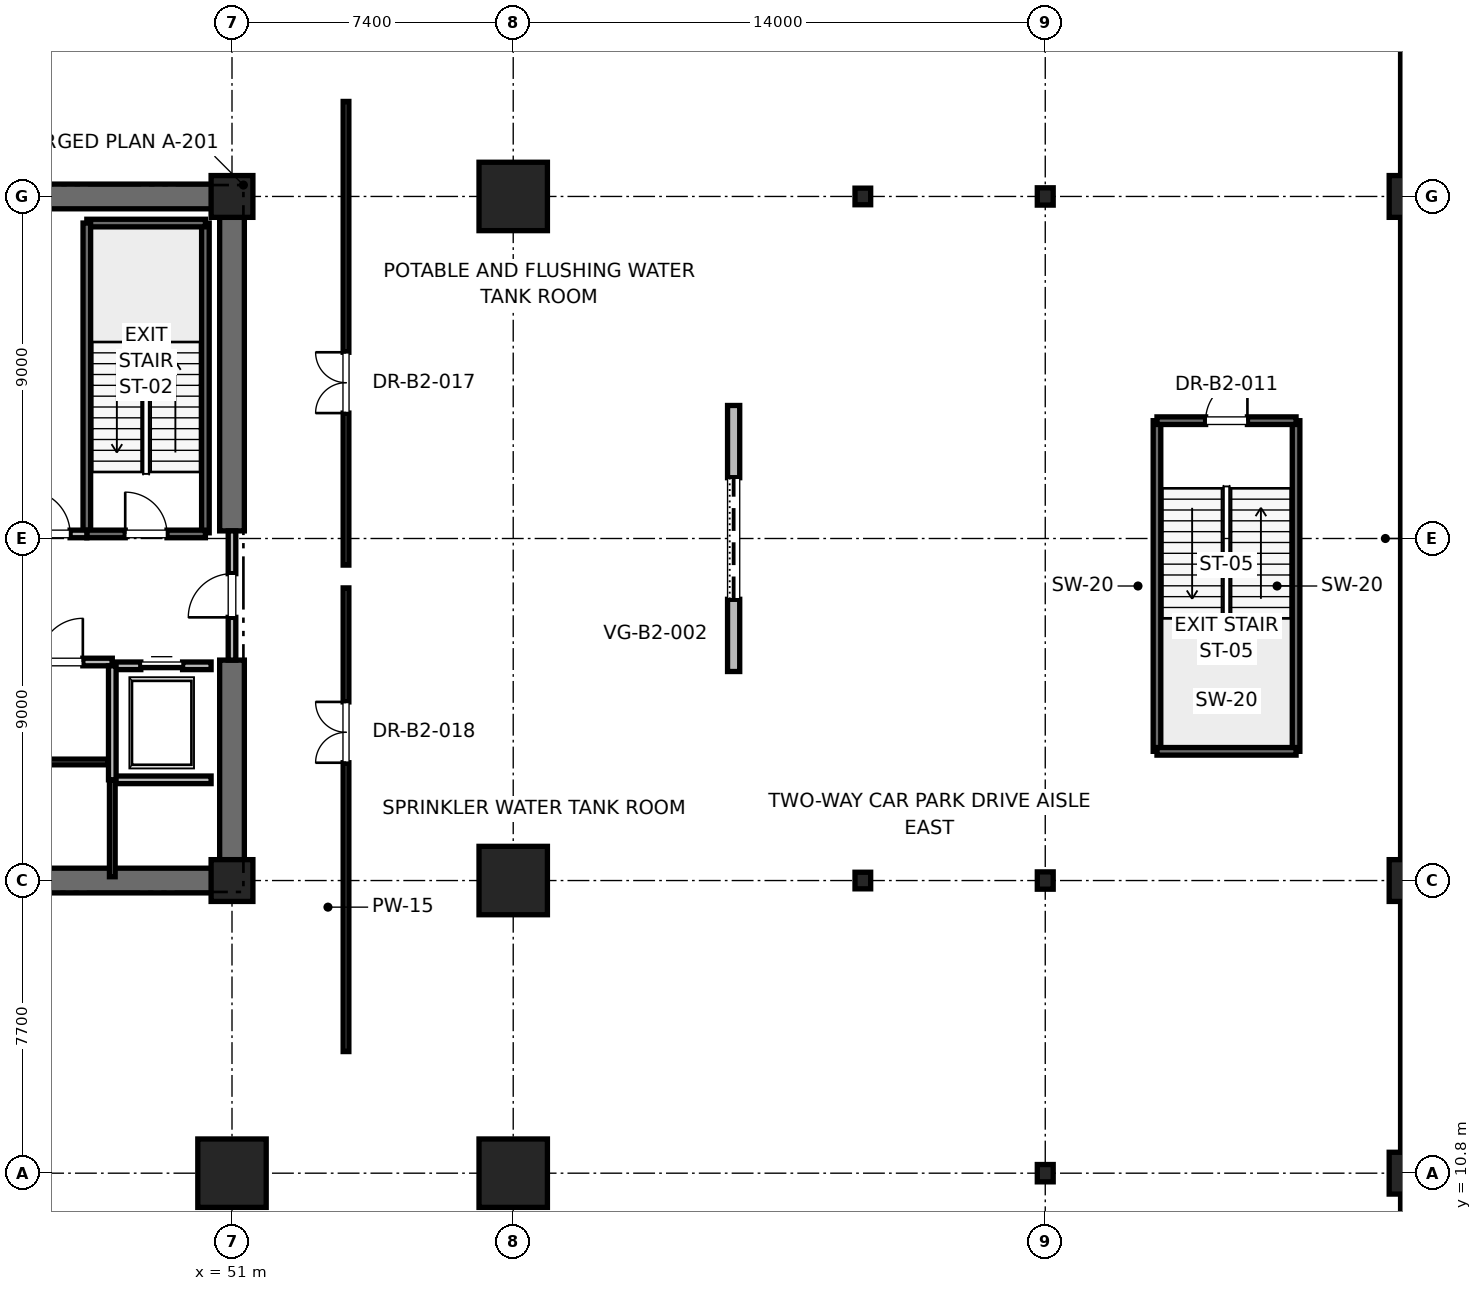
"""IFC4 building model, lengths in metres.
Left out: names, types, materials, properties, quantities, classifications, styles, units other than length and angle.
Written with IfcOpenShell. Run it as: python <this file> out.ifc"""

import sys

from ifc_helpers import new_model, si_unit, direction, frame, frame_2d, origin, origin_2d, place, context, subcontext, project, spatial, rectangle, i_section, extrude, element, fill, save


model = new_model("IFC4")
c1 = context("Model", 3, precision=1e-05, world=origin(), true_north=direction((0.0, 1.0)))
c2 = subcontext(c1, "Body", "Model", "MODEL_VIEW")
j1 = project(units=[si_unit("LENGTHUNIT", "METRE"), si_unit("PLANEANGLEUNIT", "RADIAN")], contexts=[c1])
p1 = place(None, origin())
s1 = spatial("IfcSite", under=j1, at=p1, CompositionType="ELEMENT")
p2 = place(p1, origin())
s2 = spatial("IfcBuilding", under=s1, at=p2, CompositionType="ELEMENT")
p3 = place(p2, frame((0.0, 0.0, -9.0)))
s3 = spatial("IfcBuildingStorey", under=s2, at=p3, CompositionType="ELEMENT", Elevation=-9.0)
for number, where, z_axis, x_axis in (
    (1, (51.0, 10.8, -0.3), (0.0, 0.0, 1.0), (1.0, 0.0, 0.0)),
    (2, (58.4, 18.5, -0.3), (0.0, 0.0, 1.0), (1.0, 0.0, 0.0)),
    (3, (58.4, 36.5, -0.3), (0.0, 0.0, 1.0), (1.0, 0.0, 0.0)),
    (4, (58.4, 10.8, -0.3), (0.0, 0.0, 1.0), (1.0, 0.0, 0.0)),
):
    element("IfcColumn", number, at=place(p3, frame(where, z_axis=z_axis, x_axis=x_axis)), inside=s3, PredefinedType="COLUMN", context=c2, shape_type="SweptSolid", body=[
        extrude(rectangle(XDim=1.8, YDim=1.8, at=origin_2d()), origin(), (0.0, 0.0, 1.0), 4.8),
    ])
for number, where, z_axis, x_axis in (
    (5, (67.6, 18.5, -0.3), (0.0, 0.0, 1.0), (1.0, 0.0, 0.0)),
    (6, (67.6, 36.5, -0.3), (0.0, 0.0, 1.0), (1.0, 0.0, 0.0)),
):
    element("IfcColumn", number, at=place(p3, frame(where, z_axis=z_axis, x_axis=x_axis)), inside=s3, PredefinedType="COLUMN", context=c2, shape_type="SweptSolid", body=[
        extrude(i_section(OverallWidth=0.412, OverallDepth=0.437, WebThickness=0.036, FlangeThickness=0.058, FilletRadius=0.015, at=origin_2d()), origin(), (0.0, 0.0, 1.0), 4.8),
    ])
for number, where, z_axis, x_axis in (
    (7, (51.0, 18.5, -0.3), (0.0, 0.0, 1.0), (1.0, 0.0, 0.0)),
    (8, (51.0, 36.5, -0.3), (0.0, 0.0, 1.0), (1.0, 0.0, 0.0)),
):
    element("IfcColumn", number, at=place(p3, frame(where, z_axis=z_axis, x_axis=x_axis)), inside=s3, PredefinedType="PILASTER", context=c2, shape_type="SweptSolid", body=[
        extrude(rectangle(XDim=1.1, YDim=1.1, at=origin_2d()), origin(), (0.0, 0.0, 1.0), 4.8),
    ])
for number, where, z_axis, x_axis in (
    (9, (82.0, 10.8, -0.3), (0.0, 0.0, 1.0), (1.0, 0.0, 0.0)),
    (10, (82.0, 18.5, -0.3), (0.0, 0.0, 1.0), (1.0, 0.0, 0.0)),
    (11, (82.0, 36.5, -0.3), (0.0, 0.0, 1.0), (1.0, 0.0, 0.0)),
):
    element("IfcColumn", number, at=place(p3, frame(where, z_axis=z_axis, x_axis=x_axis)), inside=s3, PredefinedType="COLUMN", context=c2, shape_type="SweptSolid", body=[
        extrude(rectangle(XDim=1.1, YDim=1.1, at=origin_2d()), origin(), (0.0, 0.0, 1.0), 4.8),
    ])
for number, where, z_axis, x_axis in (
    (12, (72.4, 10.8, -0.3), (0.0, 0.0, 1.0), (1.0, 0.0, 0.0)),
    (13, (72.4, 18.5, -0.3), (0.0, 0.0, 1.0), (1.0, 0.0, 0.0)),
    (14, (72.4, 36.5, -0.3), (0.0, 0.0, 1.0), (1.0, 0.0, 0.0)),
):
    element("IfcColumn", number, at=place(p3, frame(where, z_axis=z_axis, x_axis=x_axis)), inside=s3, PredefinedType="COLUMN", context=c2, shape_type="SweptSolid", body=[
        extrude(i_section(OverallWidth=0.418, OverallDepth=0.456, WebThickness=0.042, FlangeThickness=0.067, FilletRadius=0.015, at=origin_2d()), origin(), (0.0, 0.0, 1.0), 4.8),
    ])
p4 = place(p3, frame((41.8, 18.5, -0.3), z_axis=(0.0, 0.0, 1.0), x_axis=(1.0, 0.0, 0.0)))
e15 = element("IfcWall", 15, at=p4, inside=s3, PredefinedType="SHEAR", context=c2, shape_type="SweptSolid", body=[
    extrude(rectangle(XDim=9.2, YDim=0.65, at=frame_2d((4.6, 0.0))), origin(), (0.0, 0.0, 1.0), 4.5),
])
for number, where, z_axis, x_axis in (
    (16, (45.2, 36.5, -0.3), (0.0, 0.0, 1.0), (1.0, 0.0, 0.0)),
    (17, (51.0, 18.5, -0.3), (0.0, 0.0, 1.0), (0.0, 1.0, 0.0)),
):
    element("IfcWall", number, at=place(p3, frame(where, z_axis=z_axis, x_axis=x_axis)), inside=s3, PredefinedType="SHEAR", context=c2, shape_type="SweptSolid", body=[
        extrude(rectangle(XDim=5.8, YDim=0.65, at=frame_2d((2.9, 0.0))), origin(), (0.0, 0.0, 1.0), 4.5),
    ])
p5 = place(p3, frame((51.0, 27.7, -0.3), z_axis=(0.0, 0.0, 1.0), x_axis=(0.0, 1.0, 0.0)))
e18 = element("IfcWall", 18, at=p5, inside=s3, PredefinedType="SHEAR", context=c2, shape_type="SweptSolid", body=[
    extrude(rectangle(XDim=8.8, YDim=0.65, at=frame_2d((4.4, 0.0))), origin(), (0.0, 0.0, 1.0), 4.5),
])
p6 = place(p3, frame((82.0, -1.5, -0.3), z_axis=(0.0, 0.0, 1.0), x_axis=(0.0, 1.0, 0.0)))
e19 = element("IfcWall", 19, at=p6, inside=s3, PredefinedType="USERDEFINED", context=c2, shape_type="SweptSolid", body=[
    extrude(rectangle(XDim=58.0, YDim=0.5, at=frame_2d((29.0, 0.0))), origin(), (0.0, 0.0, 1.0), 3.68),
])
p7 = place(p3, frame((64.2, 24.0, 0.0), z_axis=(0.0, 0.0, 1.0), x_axis=(0.0, 1.0, 0.0)))
e20 = element("IfcWall", 20, at=p7, inside=s3, PredefinedType="SOLIDWALL", context=c2, shape_type="SweptSolid", body=[
    extrude(rectangle(XDim=7.0, YDim=0.32, at=frame_2d((3.5, 0.0))), origin(), (0.0, 0.0, 1.0), 4.2),
])
p8 = place(p7, frame((1.9, 0.0, 0.0)))
e21 = element("IfcOpeningElement", 21, at=p8, cuts=e20, PredefinedType="OPENING", context=c2, shape_type="SweptSolid", body=[
    extrude(rectangle(XDim=3.2, YDim=2.8, at=frame_2d((1.6, 1.4))), frame((0.0, 0.16, 0.0), z_axis=(0.0, -1.0, 0.0), x_axis=(1.0, 0.0, 0.0)), (0.0, 0.0, 1.0), 0.32),
])
p9 = place(p3, frame((50.3, 27.65, -0.3), z_axis=(0.0, 0.0, 1.0), x_axis=(0.0, 1.0, 0.0)))
e22 = element("IfcWall", 22, at=p9, inside=s3, PredefinedType="SOLIDWALL", context=c2, shape_type="SweptSolid", body=[
    extrude(rectangle(XDim=8.15, YDim=0.2, at=frame_2d((4.075, 0.0))), origin(), (0.0, 0.0, 1.0), 4.5),
])
p10 = place(p3, frame((47.18, 35.8, -0.3), z_axis=(0.0, 0.0, 1.0), x_axis=(1.0, 0.0, 0.0)))
e23 = element("IfcWall", 23, at=p10, inside=s3, PredefinedType="SOLIDWALL", context=c2, shape_type="SweptSolid", body=[
    extrude(rectangle(XDim=3.12, YDim=0.2, at=frame_2d((1.56, 0.0))), origin(), (0.0, 0.0, 1.0), 4.5),
])
p11 = place(p3, frame((47.18, 27.62, -0.3), z_axis=(0.0, 0.0, 1.0), x_axis=(0.0, 1.0, 0.0)))
e24 = element("IfcWall", 24, at=p11, inside=s3, PredefinedType="SOLIDWALL", context=c2, shape_type="SweptSolid", body=[
    extrude(rectangle(XDim=8.18, YDim=0.2, at=frame_2d((4.09, 0.0))), origin(), (0.0, 0.0, 1.0), 4.5),
])
p12 = place(p3, frame((47.18, 27.62, -0.3), z_axis=(0.0, 0.0, 1.0), x_axis=(1.0, 0.0, 0.0)))
e25 = element("IfcWall", 25, at=p12, inside=s3, PredefinedType="SOLIDWALL", context=c2, shape_type="SweptSolid", body=[
    extrude(rectangle(XDim=3.12, YDim=0.2, at=frame_2d((1.56, 0.0))), origin(), (0.0, 0.0, 1.0), 4.5),
])
p13 = place(p12, frame((1.01, 0.0, 0.3)))
e26 = element("IfcOpeningElement", 26, at=p13, cuts=e25, PredefinedType="OPENING", context=c2, shape_type="SweptSolid", body=[
    extrude(rectangle(XDim=1.1, YDim=2.15, at=frame_2d((0.55, 1.075))), frame((0.0, 0.1, 0.0), z_axis=(0.0, -1.0, 0.0), x_axis=(1.0, 0.0, 0.0)), (0.0, 0.0, 1.0), 0.2),
])
for number, where, z_axis, x_axis in (
    (27, (75.34, 21.9, -0.3), (0.0, 0.0, 1.0), (0.0, 1.0, 0.0)),
    (28, (79.0, 21.9, -0.3), (0.0, 0.0, 1.0), (0.0, 1.0, 0.0)),
):
    element("IfcWall", number, at=place(p3, frame(where, z_axis=z_axis, x_axis=x_axis)), inside=s3, PredefinedType="SOLIDWALL", context=c2, shape_type="SweptSolid", body=[
        extrude(rectangle(XDim=8.7, YDim=0.2, at=frame_2d((4.35, 0.0))), origin(), (0.0, 0.0, 1.0), 4.5),
    ])
p14 = place(p3, frame((75.34, 30.6, -0.3), z_axis=(0.0, 0.0, 1.0), x_axis=(1.0, 0.0, 0.0)))
e29 = element("IfcWall", 29, at=p14, inside=s3, PredefinedType="SOLIDWALL", context=c2, shape_type="SweptSolid", body=[
    extrude(rectangle(XDim=3.66, YDim=0.2, at=frame_2d((1.83, 0.0))), origin(), (0.0, 0.0, 1.0), 4.5),
])
p15 = place(p14, frame((1.28, 0.0, 0.3)))
e30 = element("IfcOpeningElement", 30, at=p15, cuts=e29, PredefinedType="OPENING", context=c2, shape_type="SweptSolid", body=[
    extrude(rectangle(XDim=1.1, YDim=2.15, at=frame_2d((0.55, 1.075))), frame((0.0, 0.1, 0.0), z_axis=(0.0, -1.0, 0.0), x_axis=(1.0, 0.0, 0.0)), (0.0, 0.0, 1.0), 0.2),
])
p16 = place(p3, frame((75.34, 21.9, -0.3), z_axis=(0.0, 0.0, 1.0), x_axis=(1.0, 0.0, 0.0)))
e31 = element("IfcWall", 31, at=p16, inside=s3, PredefinedType="SOLIDWALL", context=c2, shape_type="SweptSolid", body=[
    extrude(rectangle(XDim=3.66, YDim=0.2, at=frame_2d((1.83, 0.0))), origin(), (0.0, 0.0, 1.0), 4.5),
])
p17 = place(p3, frame((45.15, 24.25, 0.0), z_axis=(0.0, 0.0, 1.0), x_axis=(1.0, 0.0, 0.0)))
e32 = element("IfcWall", 32, at=p17, inside=s3, PredefinedType="PARTITIONING", context=c2, shape_type="SweptSolid", body=[
    extrude(rectangle(XDim=2.7, YDim=0.2, at=frame_2d((1.35, 0.0))), origin(), (0.0, 0.0, 1.0), 4.2),
])
p18 = place(p17, frame((0.775, 0.0, 0.0)))
e33 = element("IfcOpeningElement", 33, at=p18, cuts=e32, PredefinedType="OPENING", context=c2, shape_type="SweptSolid", body=[
    extrude(rectangle(XDim=1.15, YDim=2.2, at=frame_2d((0.575, 1.1))), frame((0.0, 0.1, 0.0), z_axis=(0.0, -1.0, 0.0), x_axis=(1.0, 0.0, 0.0)), (0.0, 0.0, 1.0), 0.2),
])
p19 = place(p3, frame((45.15, 27.62, 0.0), z_axis=(0.0, 0.0, 1.0), x_axis=(1.0, 0.0, 0.0)))
e34 = element("IfcWall", 34, at=p19, inside=s3, PredefinedType="PARTITIONING", context=c2, shape_type="SweptSolid", body=[
    extrude(rectangle(XDim=2.03, YDim=0.2, at=frame_2d((1.015, 0.0))), origin(), (0.0, 0.0, 1.0), 4.2),
])
p20 = place(p19, frame((0.44, 0.0, 0.0)))
e35 = element("IfcOpeningElement", 35, at=p20, cuts=e34, PredefinedType="OPENING", context=c2, shape_type="SweptSolid", body=[
    extrude(rectangle(XDim=1.15, YDim=2.2, at=frame_2d((0.575, 1.1))), frame((0.0, 0.1, 0.0), z_axis=(0.0, -1.0, 0.0), x_axis=(1.0, 0.0, 0.0)), (0.0, 0.0, 1.0), 0.2),
])
p21 = place(p3, frame((51.0, 24.3, 0.0), z_axis=(0.0, 0.0, 1.0), x_axis=(0.0, 1.0, 0.0)))
e36 = element("IfcWall", 36, at=p21, inside=s3, PredefinedType="PARTITIONING", context=c2, shape_type="SweptSolid", body=[
    extrude(rectangle(XDim=3.4, YDim=0.2, at=frame_2d((1.7, 0.0))), origin(), (0.0, 0.0, 1.0), 2.98),
])
p22 = place(p21, frame((1.125, 0.0, 0.0)))
e37 = element("IfcOpeningElement", 37, at=p22, cuts=e36, PredefinedType="OPENING", context=c2, shape_type="SweptSolid", body=[
    extrude(rectangle(XDim=1.15, YDim=2.2, at=frame_2d((0.575, 1.1))), frame((0.0, 0.1, 0.0), z_axis=(0.0, -1.0, 0.0), x_axis=(1.0, 0.0, 0.0)), (0.0, 0.0, 1.0), 0.2),
])
p23 = place(p3, frame((47.85, 21.15, 0.0), z_axis=(0.0, 0.0, 1.0), x_axis=(1.0, 0.0, 0.0)))
e38 = element("IfcWall", 38, at=p23, inside=s3, PredefinedType="SOLIDWALL", context=c2, shape_type="SweptSolid", body=[
    extrude(rectangle(XDim=2.6, YDim=0.2, at=frame_2d((1.3, 0.0))), origin(), (0.0, 0.0, 1.0), 4.2),
])
p24 = place(p3, frame((50.45, 24.15, 0.0), z_axis=(0.0, 0.0, 1.0), x_axis=(-1.0, 0.0, 0.0)))
e39 = element("IfcWall", 39, at=p24, inside=s3, PredefinedType="SOLIDWALL", context=c2, shape_type="SweptSolid", body=[
    extrude(rectangle(XDim=2.6, YDim=0.2, at=frame_2d((1.3, 0.0))), origin(), (0.0, 0.0, 1.0), 2.98),
])
p25 = place(p24, frame((0.75, 0.0, 0.0)))
e40 = element("IfcOpeningElement", 40, at=p25, cuts=e39, PredefinedType="OPENING", context=c2, shape_type="SweptSolid", body=[
    extrude(rectangle(XDim=1.1, YDim=2.2, at=frame_2d((0.55, 1.1))), frame((0.0, 0.1, 0.0), z_axis=(0.0, -1.0, 0.0), x_axis=(1.0, 0.0, 0.0)), (0.0, 0.0, 1.0), 0.2),
])
p26 = place(p3, frame((47.85, 24.15, 0.0), z_axis=(0.0, 0.0, 1.0), x_axis=(0.0, -1.0, 0.0)))
e41 = element("IfcWall", 41, at=p26, inside=s3, PredefinedType="SOLIDWALL", context=c2, shape_type="SweptSolid", body=[
    extrude(rectangle(XDim=3.0, YDim=0.2, at=frame_2d((1.5, 0.0))), origin(), (0.0, 0.0, 1.0), 4.2),
])
p27 = place(p3, frame((47.85, 18.6, 0.0), z_axis=(0.0, 0.0, 1.0), x_axis=(0.0, 1.0, 0.0)))
e42 = element("IfcWall", 42, at=p27, inside=s3, PredefinedType="PARTITIONING", context=c2, shape_type="SweptSolid", body=[
    extrude(rectangle(XDim=2.54, YDim=0.15, at=frame_2d((1.27, 0.0))), origin(), (0.0, 0.0, 1.0), 2.85),
])
p28 = place(p3, frame((41.76, 21.62, 0.0), z_axis=(0.0, 0.0, 1.0), x_axis=(1.0, 0.0, 0.0)))
e43 = element("IfcWall", 43, at=p28, inside=s3, PredefinedType="PARTITIONING", context=c2, shape_type="SweptSolid", body=[
    extrude(rectangle(XDim=5.98, YDim=0.15, at=frame_2d((2.99, 0.0))), origin(), (0.0, 0.0, 1.0), 2.85),
])
p29 = place(p28, frame((2.55, 0.0, 0.0)))
e44 = element("IfcOpeningElement", 44, at=p29, cuts=e43, PredefinedType="OPENING", context=c2, shape_type="SweptSolid", body=[
    extrude(rectangle(XDim=0.88, YDim=2.1, at=frame_2d((0.44, 1.05))), frame((0.0, 0.075, 0.0), z_axis=(0.0, -1.0, 0.0), x_axis=(1.0, 0.0, 0.0)), (0.0, 0.0, 1.0), 0.15),
])
p30 = place(p3, frame((54.0, 14.0, 0.0), z_axis=(0.0, 0.0, 1.0), x_axis=(0.0, 1.0, 0.0)))
e45 = element("IfcWall", 45, at=p30, inside=s3, PredefinedType="PARTITIONING", context=c2, shape_type="SweptSolid", body=[
    extrude(rectangle(XDim=12.2, YDim=0.15, at=frame_2d((6.1, 0.0))), origin(), (0.0, 0.0, 1.0), 2.85),
])
p31 = place(p30, frame((7.6, 0.0, 0.0)))
e46 = element("IfcOpeningElement", 46, at=p31, cuts=e45, PredefinedType="OPENING", context=c2, shape_type="SweptSolid", body=[
    extrude(rectangle(XDim=1.6, YDim=2.25, at=frame_2d((0.8, 1.125))), frame((0.0, 0.075, 0.0), z_axis=(0.0, -1.0, 0.0), x_axis=(1.0, 0.0, 0.0)), (0.0, 0.0, 1.0), 0.15),
])
p32 = place(p3, frame((54.0, 26.8, 0.0), z_axis=(0.0, 0.0, 1.0), x_axis=(0.0, 1.0, 0.0)))
e47 = element("IfcWall", 47, at=p32, inside=s3, PredefinedType="PARTITIONING", context=c2, shape_type="SweptSolid", body=[
    extrude(rectangle(XDim=12.2, YDim=0.15, at=frame_2d((6.1, 0.0))), origin(), (0.0, 0.0, 1.0), 2.85),
])
p33 = place(p32, frame((4.0, 0.0, 0.0)))
e48 = element("IfcOpeningElement", 48, at=p33, cuts=e47, PredefinedType="OPENING", context=c2, shape_type="SweptSolid", body=[
    extrude(rectangle(XDim=1.6, YDim=2.25, at=frame_2d((0.8, 1.125))), frame((0.0, 0.075, 0.0), z_axis=(0.0, -1.0, 0.0), x_axis=(1.0, 0.0, 0.0)), (0.0, 0.0, 1.0), 0.15),
])
p34 = place(p8, origin())
e49 = element("IfcDoor", 49, at=p34, inside=s3, OperationType="ROLLINGUP", PredefinedType="GATE", context=c2, shape_type="SweptSolid", body=[
    extrude(rectangle(XDim=3.2, YDim=2.8, at=frame_2d((1.6, 1.4))), frame((0.0, 0.025, 0.0), z_axis=(0.0, -1.0, 0.0), x_axis=(1.0, 0.0, 0.0)), (0.0, 0.0, 1.0), 0.05),
])
fill(e21, e49)
p35 = place(p13, origin())
e50 = element("IfcDoor", 50, at=p35, inside=s3, OperationType="SINGLE_SWING_LEFT", PredefinedType="DOOR", context=c2, shape_type="SweptSolid", body=[
    extrude(rectangle(XDim=1.1, YDim=2.15, at=frame_2d((0.55, 1.075))), frame((0.0, 0.025, 0.0), z_axis=(0.0, -1.0, 0.0), x_axis=(1.0, 0.0, 0.0)), (0.0, 0.0, 1.0), 0.05),
])
fill(e26, e50)
p36 = place(p15, origin())
e51 = element("IfcDoor", 51, at=p36, inside=s3, OperationType="SINGLE_SWING_RIGHT", PredefinedType="DOOR", context=c2, shape_type="SweptSolid", body=[
    extrude(rectangle(XDim=1.1, YDim=2.15, at=frame_2d((0.55, 1.075))), frame((0.0, 0.025, 0.0), z_axis=(0.0, -1.0, 0.0), x_axis=(1.0, 0.0, 0.0)), (0.0, 0.0, 1.0), 0.05),
])
fill(e30, e51)
p37 = place(p18, origin())
e52 = element("IfcDoor", 52, at=p37, inside=s3, OperationType="SINGLE_SWING_RIGHT", PredefinedType="DOOR", context=c2, shape_type="SweptSolid", body=[
    extrude(rectangle(XDim=1.15, YDim=2.2, at=frame_2d((0.575, 1.1))), frame((0.0, 0.025, 0.0), z_axis=(0.0, -1.0, 0.0), x_axis=(1.0, 0.0, 0.0)), (0.0, 0.0, 1.0), 0.05),
])
fill(e33, e52)
p38 = place(p20, origin())
e53 = element("IfcDoor", 53, at=p38, inside=s3, OperationType="SINGLE_SWING_LEFT", PredefinedType="DOOR", context=c2, shape_type="SweptSolid", body=[
    extrude(rectangle(XDim=1.15, YDim=2.2, at=frame_2d((0.575, 1.1))), frame((0.0, 0.025, 0.0), z_axis=(0.0, -1.0, 0.0), x_axis=(1.0, 0.0, 0.0)), (0.0, 0.0, 1.0), 0.05),
])
fill(e35, e53)
p39 = place(p22, origin())
e54 = element("IfcDoor", 54, at=p39, inside=s3, OperationType="SINGLE_SWING_LEFT", PredefinedType="DOOR", context=c2, shape_type="SweptSolid", body=[
    extrude(rectangle(XDim=1.15, YDim=2.2, at=frame_2d((0.575, 1.1))), frame((0.0, 0.025, 0.0), z_axis=(0.0, -1.0, 0.0), x_axis=(1.0, 0.0, 0.0)), (0.0, 0.0, 1.0), 0.05),
])
fill(e37, e54)
p40 = place(p25, origin())
e55 = element("IfcDoor", 55, at=p40, inside=s3, OperationType="SLIDING_TO_RIGHT", PredefinedType="DOOR", context=c2, shape_type="SweptSolid", body=[
    extrude(rectangle(XDim=1.1, YDim=2.2, at=frame_2d((0.55, 1.1))), frame((0.0, 0.025, 0.0), z_axis=(0.0, -1.0, 0.0), x_axis=(1.0, 0.0, 0.0)), (0.0, 0.0, 1.0), 0.05),
])
fill(e40, e55)
p41 = place(p31, origin())
e56 = element("IfcDoor", 56, at=p41, inside=s3, OperationType="DOUBLE_DOOR_SINGLE_SWING", PredefinedType="DOOR", context=c2, shape_type="SweptSolid", body=[
    extrude(rectangle(XDim=1.6, YDim=2.25, at=frame_2d((0.8, 1.125))), frame((0.0, 0.025, 0.0), z_axis=(0.0, -1.0, 0.0), x_axis=(1.0, 0.0, 0.0)), (0.0, 0.0, 1.0), 0.05),
])
fill(e46, e56)
p42 = place(p33, origin())
e57 = element("IfcDoor", 57, at=p42, inside=s3, OperationType="DOUBLE_DOOR_SINGLE_SWING", PredefinedType="DOOR", context=c2, shape_type="SweptSolid", body=[
    extrude(rectangle(XDim=1.6, YDim=2.25, at=frame_2d((0.8, 1.125))), frame((0.0, 0.025, 0.0), z_axis=(0.0, -1.0, 0.0), x_axis=(1.0, 0.0, 0.0)), (0.0, 0.0, 1.0), 0.05),
])
fill(e48, e57)
save(model, sys.argv[1])
